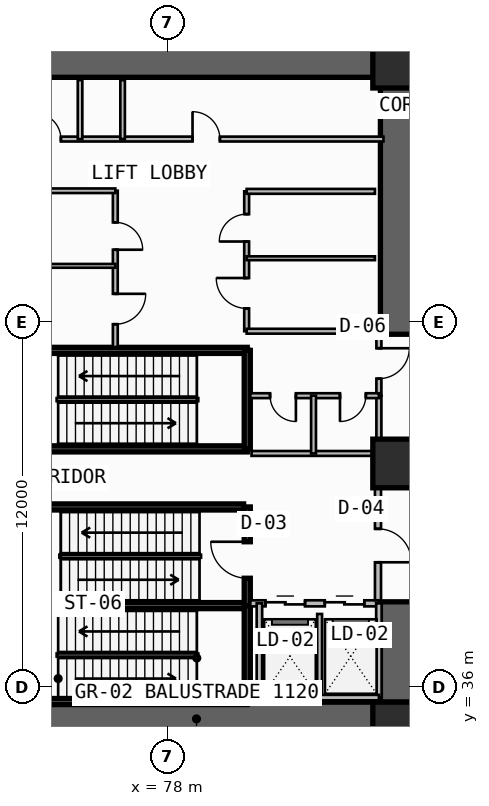
"""IFC4 building model, lengths in metres.
Left out: names, types, materials, properties, quantities, classifications, styles, units other than length and angle.
Written with IfcOpenShell. Run it as: python <this file> out.ifc"""

import sys

from ifc_helpers import new_model, si_unit, direction, frame, frame_2d, origin, origin_2d, place, context, subcontext, project, spatial, rectangle, extrude, element, fill, save


model = new_model("IFC4")
c1 = context("Model", 3, precision=1e-05, world=origin(), true_north=direction((0.0, 1.0)))
c2 = subcontext(c1, "Body", "Model", "MODEL_VIEW")
j1 = project(units=[si_unit("LENGTHUNIT", "METRE"), si_unit("PLANEANGLEUNIT", "RADIAN")], contexts=[c1])
p1 = place(None, origin())
s1 = spatial("IfcSite", under=j1, at=p1, CompositionType="ELEMENT")
p2 = place(p1, origin())
s2 = spatial("IfcBuilding", under=s1, at=p2, CompositionType="ELEMENT")
p3 = place(p2, frame((0.0, 0.0, -6.0)))
s3 = spatial("IfcBuildingStorey", under=s2, at=p3, CompositionType="ELEMENT", Elevation=-6.0)
p4 = place(p3, frame((71.8, 34.95, -0.6), z_axis=(0.0, 0.0, 1.0), x_axis=(1.0, 0.0, 0.0)))
e1 = element("IfcWall", 1, at=p4, inside=s3, PredefinedType="SHEAR", context=c2, shape_type="SweptSolid", body=[
    extrude(rectangle(XDim=14.3, YDim=1.1, at=frame_2d((7.15, 0.0))), origin(), (0.0, 0.0, 1.0), 6.2),
])
p5 = place(p3, frame((85.55, 35.5, -0.6), z_axis=(0.0, 0.0, 1.0), x_axis=(0.0, 1.0, 0.0)))
e2 = element("IfcWall", 2, at=p5, inside=s3, PredefinedType="SHEAR", context=c2, shape_type="SweptSolid", body=[
    extrude(rectangle(XDim=3.3, YDim=1.1, at=frame_2d((1.65, 0.0))), origin(), (0.0, 0.0, 1.0), 6.2),
])
p6 = place(p3, frame((71.8, 56.6, -0.6), z_axis=(0.0, 0.0, 1.0), x_axis=(1.0, 0.0, 0.0)))
e3 = element("IfcWall", 3, at=p6, inside=s3, PredefinedType="SHEAR", context=c2, shape_type="SweptSolid", body=[
    extrude(rectangle(XDim=14.3, YDim=1.1, at=frame_2d((7.15, 0.0))), origin(), (0.0, 0.0, 1.0), 6.2),
])
p7 = place(p3, frame((85.55, 47.6, -0.6), z_axis=(0.0, 0.0, 1.0), x_axis=(0.0, 1.0, 0.0)))
e4 = element("IfcWall", 4, at=p7, inside=s3, PredefinedType="SHEAR", context=c2, shape_type="SweptSolid", body=[
    extrude(rectangle(XDim=8.45, YDim=1.1, at=frame_2d((4.225, 0.0))), origin(), (0.0, 0.0, 1.0), 6.2),
])
for number, where, z_axis, x_axis in (
    (5, (85.55, 34.7, -0.6), (0.0, 0.0, 1.0), (1.0, 0.0, 0.0)),
    (6, (85.55, 43.35, -0.6), (0.0, 0.0, 1.0), (1.0, 0.0, 0.0)),
    (7, (85.55, 56.5, -0.6), (0.0, 0.0, 1.0), (1.0, 0.0, 0.0)),
):
    element("IfcColumn", number, at=place(p3, frame(where, z_axis=z_axis, x_axis=x_axis)), inside=s3, PredefinedType="COLUMN", context=c2, shape_type="SweptSolid", body=[
        extrude(rectangle(XDim=1.6, YDim=1.6, at=origin_2d()), origin(), (0.0, 0.0, 1.0), 6.6),
    ])
for number, where, z_axis, x_axis in (
    (8, (72.92, 35.52, -0.6), (0.0, 0.0, 1.0), (1.0, 0.0, 0.0)),
    (9, (72.92, 38.675, -0.6), (0.0, 0.0, 1.0), (1.0, 0.0, 0.0)),
):
    element("IfcWall", number, at=place(p3, frame(where, z_axis=z_axis, x_axis=x_axis)), inside=s3, PredefinedType="SOLIDWALL", context=c2, shape_type="SweptSolid", body=[
        extrude(rectangle(XDim=7.7, YDim=0.2, at=frame_2d((3.85, 0.0))), origin(), (0.0, 0.0, 1.0), 6.2),
    ])
p8 = place(p3, frame((80.62, 35.52, -0.6), z_axis=(0.0, 0.0, 1.0), x_axis=(0.0, 1.0, 0.0)))
e10 = element("IfcWall", 10, at=p8, inside=s3, PredefinedType="SOLIDWALL", context=c2, shape_type="SweptSolid", body=[
    extrude(rectangle(XDim=3.155, YDim=0.2, at=frame_2d((1.578, 0.0))), origin(), (0.0, 0.0, 1.0), 6.2),
])
p9 = place(p3, frame((80.62, 38.675, -0.6), z_axis=(0.0, 0.0, 1.0), x_axis=(0.0, 1.0, 0.0)))
e11 = element("IfcWall", 11, at=p9, inside=s3, PredefinedType="SOLIDWALL", context=c2, shape_type="SweptSolid", body=[
    extrude(rectangle(XDim=3.245, YDim=0.2, at=frame_2d((1.623, 0.0))), origin(), (0.0, 0.0, 1.0), 6.2),
])
p10 = place(p9, frame((0.9, 0.0, 0.6)))
e12 = element("IfcOpeningElement", 12, at=p10, cuts=e11, PredefinedType="OPENING", context=c2, shape_type="SweptSolid", body=[
    extrude(rectangle(XDim=1.2, YDim=2.2, at=frame_2d((0.6, 1.1))), frame((0.0, 0.11, 0.0), z_axis=(0.0, -1.0, 0.0), x_axis=(1.0, 0.0, 0.0)), (0.0, 0.0, 1.0), 0.22),
])
p11 = place(p3, frame((80.72, 38.75, 0.0), z_axis=(0.0, 0.0, 1.0), x_axis=(1.0, 0.0, 0.0)))
e13 = element("IfcWall", 13, at=p11, inside=s3, PredefinedType="SOLIDWALL", context=c2, shape_type="SweptSolid", body=[
    extrude(rectangle(XDim=4.26, YDim=0.2, at=frame_2d((2.13, 0.0))), origin(), (0.0, 0.0, 1.0), 5.6),
])
p12 = place(p11, frame((0.5, 0.0, 0.0)))
e14 = element("IfcOpeningElement", 14, at=p12, cuts=e13, PredefinedType="OPENING", context=c2, shape_type="SweptSolid", body=[
    extrude(rectangle(XDim=1.3, YDim=2.3, at=frame_2d((0.65, 1.15))), frame((0.0, 0.11, 0.0), z_axis=(0.0, -1.0, 0.0), x_axis=(1.0, 0.0, 0.0)), (0.0, 0.0, 1.0), 0.22),
])
p13 = place(p11, frame((2.45, 0.0, 0.0)))
e15 = element("IfcOpeningElement", 15, at=p13, cuts=e13, PredefinedType="OPENING", context=c2, shape_type="SweptSolid", body=[
    extrude(rectangle(XDim=1.3, YDim=2.3, at=frame_2d((0.65, 1.15))), frame((0.0, 0.11, 0.0), z_axis=(0.0, -1.0, 0.0), x_axis=(1.0, 0.0, 0.0)), (0.0, 0.0, 1.0), 0.22),
])
p14 = place(p3, frame((83.0, 35.65, 0.0), z_axis=(0.0, 0.0, 1.0), x_axis=(0.0, 1.0, 0.0)))
e16 = element("IfcWall", 16, at=p14, inside=s3, PredefinedType="PLUMBINGWALL", context=c2, shape_type="SweptSolid", body=[
    extrude(rectangle(XDim=2.75, YDim=0.16, at=frame_2d((1.375, 0.0))), origin(), (0.0, 0.0, 1.0), 5.6),
])
for number, where, z_axis, x_axis in (
    (17, (84.95, 35.65, 0.0), (0.0, 0.0, 1.0), (0.0, 1.0, 0.0)),
    (18, (81.02, 35.65, 0.0), (0.0, 0.0, 1.0), (0.0, 1.0, 0.0)),
):
    element("IfcWall", number, at=place(p3, frame(where, z_axis=z_axis, x_axis=x_axis)), inside=s3, PredefinedType="SOLIDWALL", context=c2, shape_type="SweptSolid", body=[
        extrude(rectangle(XDim=3.1, YDim=0.18, at=frame_2d((1.55, 0.0))), origin(), (0.0, 0.0, 1.0), 5.6),
    ])
p15 = place(p3, frame((81.02, 35.65, 0.0), z_axis=(0.0, 0.0, 1.0), x_axis=(1.0, 0.0, 0.0)))
e19 = element("IfcWall", 19, at=p15, inside=s3, PredefinedType="SOLIDWALL", context=c2, shape_type="SweptSolid", body=[
    extrude(rectangle(XDim=3.93, YDim=0.18, at=frame_2d((1.965, 0.0))), origin(), (0.0, 0.0, 1.0), 5.6),
])
p16 = place(p3, frame((84.92, 38.85, 0.0), z_axis=(0.0, 0.0, 1.0), x_axis=(0.0, 1.0, 0.0)))
e20 = element("IfcWall", 20, at=p16, inside=s3, PredefinedType="SOLIDWALL", context=c2, shape_type="SweptSolid", body=[
    extrude(rectangle(XDim=4.83, YDim=0.2, at=frame_2d((2.415, 0.0))), origin(), (0.0, 0.0, 1.0), 5.6),
])
p17 = place(p16, frame((1.25, 0.0, 0.0)))
e21 = element("IfcOpeningElement", 21, at=p17, cuts=e20, PredefinedType="OPENING", context=c2, shape_type="SweptSolid", body=[
    extrude(rectangle(XDim=1.1, YDim=2.2, at=frame_2d((0.55, 1.1))), frame((0.0, 0.11, 0.0), z_axis=(0.0, -1.0, 0.0), x_axis=(1.0, 0.0, 0.0)), (0.0, 0.0, 1.0), 0.22),
])
p18 = place(p3, frame((72.92, 41.92, -0.6), z_axis=(0.0, 0.0, 1.0), x_axis=(1.0, 0.0, 0.0)))
e22 = element("IfcWall", 22, at=p18, inside=s3, PredefinedType="SOLIDWALL", context=c2, shape_type="SweptSolid", body=[
    extrude(rectangle(XDim=7.58, YDim=0.2, at=frame_2d((3.79, 0.0))), origin(), (0.0, 0.0, 1.0), 6.2),
])
for number, where, z_axis, x_axis in (
    (23, (72.92, 43.83, -0.6), (0.0, 0.0, 1.0), (1.0, 0.0, 0.0)),
    (24, (72.92, 47.07, -0.6), (0.0, 0.0, 1.0), (1.0, 0.0, 0.0)),
):
    element("IfcWall", number, at=place(p3, frame(where, z_axis=z_axis, x_axis=x_axis)), inside=s3, PredefinedType="SOLIDWALL", context=c2, shape_type="SweptSolid", body=[
        extrude(rectangle(XDim=7.7, YDim=0.2, at=frame_2d((3.85, 0.0))), origin(), (0.0, 0.0, 1.0), 6.2),
    ])
p19 = place(p3, frame((80.62, 43.83, -0.6), z_axis=(0.0, 0.0, 1.0), x_axis=(0.0, 1.0, 0.0)))
e25 = element("IfcWall", 25, at=p19, inside=s3, PredefinedType="SOLIDWALL", context=c2, shape_type="SweptSolid", body=[
    extrude(rectangle(XDim=3.24, YDim=0.2, at=frame_2d((1.62, 0.0))), origin(), (0.0, 0.0, 1.0), 6.2),
])
p20 = place(p3, frame((84.95, 43.68, 0.0), z_axis=(0.0, 0.0, 1.0), x_axis=(0.0, 1.0, 0.0)))
e26 = element("IfcWall", 26, at=p20, inside=s3, PredefinedType="PLUMBINGWALL", context=c2, shape_type="SweptSolid", body=[
    extrude(rectangle(XDim=1.9, YDim=0.165, at=frame_2d((0.95, 0.0))), origin(), (0.0, 0.0, 1.0), 5.6),
])
p21 = place(p3, frame((84.95, 45.58, 0.0), z_axis=(0.0, 0.0, 1.0), x_axis=(0.0, 1.0, 0.0)))
e27 = element("IfcWall", 27, at=p21, inside=s3, PredefinedType="PARTITIONING", context=c2, shape_type="SweptSolid", body=[
    extrude(rectangle(XDim=2.12, YDim=0.165, at=frame_2d((1.06, 0.0))), origin(), (0.0, 0.0, 1.0), 5.6),
])
p22 = place(p21, frame((0.56, 0.0, 0.0)))
e28 = element("IfcOpeningElement", 28, at=p22, cuts=e27, PredefinedType="OPENING", context=c2, shape_type="SweptSolid", body=[
    extrude(rectangle(XDim=1.0, YDim=2.2, at=frame_2d((0.5, 1.1))), frame((0.0, 0.093, 0.0), z_axis=(0.0, -1.0, 0.0), x_axis=(1.0, 0.0, 0.0)), (0.0, 0.0, 1.0), 0.185),
])
p23 = place(p3, frame((80.72, 45.58, 0.0), z_axis=(0.0, 0.0, 1.0), x_axis=(1.0, 0.0, 0.0)))
e29 = element("IfcWall", 29, at=p23, inside=s3, PredefinedType="PLUMBINGWALL", context=c2, shape_type="SweptSolid", body=[
    extrude(rectangle(XDim=4.23, YDim=0.16, at=frame_2d((2.115, 0.0))), origin(), (0.0, 0.0, 1.0), 5.6),
])
p24 = place(p23, frame((0.65, 0.0, 0.0)))
e30 = element("IfcOpeningElement", 30, at=p24, cuts=e29, PredefinedType="OPENING", context=c2, shape_type="SweptSolid", body=[
    extrude(rectangle(XDim=0.85, YDim=2.05, at=frame_2d((0.425, 1.025))), frame((0.0, 0.09, 0.0), z_axis=(0.0, -1.0, 0.0), x_axis=(1.0, 0.0, 0.0)), (0.0, 0.0, 1.0), 0.18),
])
p25 = place(p23, frame((2.95, 0.0, 0.0)))
e31 = element("IfcOpeningElement", 31, at=p25, cuts=e29, PredefinedType="OPENING", context=c2, shape_type="SweptSolid", body=[
    extrude(rectangle(XDim=0.85, YDim=2.05, at=frame_2d((0.425, 1.025))), frame((0.0, 0.09, 0.0), z_axis=(0.0, -1.0, 0.0), x_axis=(1.0, 0.0, 0.0)), (0.0, 0.0, 1.0), 0.18),
])
p26 = place(p3, frame((80.76, 43.68, 0.0), z_axis=(0.0, 0.0, 1.0), x_axis=(1.0, 0.0, 0.0)))
e32 = element("IfcWall", 32, at=p26, inside=s3, PredefinedType="PLUMBINGWALL", context=c2, shape_type="SweptSolid", body=[
    extrude(rectangle(XDim=4.19, YDim=0.16, at=frame_2d((2.095, 0.0))), origin(), (0.0, 0.0, 1.0), 5.6),
])
p27 = place(p3, frame((82.8, 43.68, 0.0), z_axis=(0.0, 0.0, 1.0), x_axis=(0.0, 1.0, 0.0)))
e33 = element("IfcWall", 33, at=p27, inside=s3, PredefinedType="PLUMBINGWALL", context=c2, shape_type="SweptSolid", body=[
    extrude(rectangle(XDim=1.9, YDim=0.16, at=frame_2d((0.95, 0.0))), origin(), (0.0, 0.0, 1.0), 5.6),
])
p28 = place(p3, frame((76.28, 47.18, 0.0), z_axis=(0.0, 0.0, 1.0), x_axis=(0.0, 1.0, 0.0)))
e34 = element("IfcWall", 34, at=p28, inside=s3, PredefinedType="SOLIDWALL", context=c2, shape_type="SweptSolid", body=[
    extrude(rectangle(XDim=5.14, YDim=0.16, at=frame_2d((2.57, 0.0))), origin(), (0.0, 0.0, 1.0), 5.6),
])
p29 = place(p28, frame((0.75, 0.0, 0.0)))
e35 = element("IfcOpeningElement", 35, at=p29, cuts=e34, PredefinedType="OPENING", context=c2, shape_type="SweptSolid", body=[
    extrude(rectangle(XDim=1.0, YDim=2.2, at=frame_2d((0.5, 1.1))), frame((0.0, 0.09, 0.0), z_axis=(0.0, -1.0, 0.0), x_axis=(1.0, 0.0, 0.0)), (0.0, 0.0, 1.0), 0.18),
])
p30 = place(p28, frame((3.2, 0.0, 0.0)))
e36 = element("IfcOpeningElement", 36, at=p30, cuts=e34, PredefinedType="OPENING", context=c2, shape_type="SweptSolid", body=[
    extrude(rectangle(XDim=0.9, YDim=2.1, at=frame_2d((0.45, 1.05))), frame((0.0, 0.09, 0.0), z_axis=(0.0, -1.0, 0.0), x_axis=(1.0, 0.0, 0.0)), (0.0, 0.0, 1.0), 0.18),
])
p31 = place(p3, frame((72.95, 52.32, 0.0), z_axis=(0.0, 0.0, 1.0), x_axis=(1.0, 0.0, 0.0)))
e37 = element("IfcWall", 37, at=p31, inside=s3, PredefinedType="SOLIDWALL", context=c2, shape_type="SweptSolid", body=[
    extrude(rectangle(XDim=3.33, YDim=0.15, at=frame_2d((1.665, 0.0))), origin(), (0.0, 0.0, 1.0), 5.6),
])
p32 = place(p3, frame((73.0, 49.85, 0.0), z_axis=(0.0, 0.0, 1.0), x_axis=(1.0, 0.0, 0.0)))
e38 = element("IfcWall", 38, at=p32, inside=s3, PredefinedType="PARTITIONING", context=c2, shape_type="SweptSolid", body=[
    extrude(rectangle(XDim=3.28, YDim=0.125, at=frame_2d((1.64, 0.0))), origin(), (0.0, 0.0, 1.0), 5.6),
])
p33 = place(p3, frame((80.6, 47.7, 0.0), z_axis=(0.0, 0.0, 1.0), x_axis=(0.0, 1.0, 0.0)))
e39 = element("IfcWall", 39, at=p33, inside=s3, PredefinedType="SOLIDWALL", context=c2, shape_type="SweptSolid", body=[
    extrude(rectangle(XDim=4.6, YDim=0.16, at=frame_2d((2.3, 0.0))), origin(), (0.0, 0.0, 1.0), 5.6),
])
p34 = place(p33, frame((0.75, 0.0, 0.0)))
e40 = element("IfcOpeningElement", 40, at=p34, cuts=e39, PredefinedType="OPENING", context=c2, shape_type="SweptSolid", body=[
    extrude(rectangle(XDim=1.0, YDim=2.2, at=frame_2d((0.5, 1.1))), frame((0.0, 0.09, 0.0), z_axis=(0.0, -1.0, 0.0), x_axis=(1.0, 0.0, 0.0)), (0.0, 0.0, 1.0), 0.18),
])
p35 = place(p33, frame((2.95, 0.0, 0.0)))
e41 = element("IfcOpeningElement", 41, at=p35, cuts=e39, PredefinedType="OPENING", context=c2, shape_type="SweptSolid", body=[
    extrude(rectangle(XDim=0.9, YDim=2.1, at=frame_2d((0.45, 1.05))), frame((0.0, 0.09, 0.0), z_axis=(0.0, -1.0, 0.0), x_axis=(1.0, 0.0, 0.0)), (0.0, 0.0, 1.0), 0.18),
])
p36 = place(p3, frame((80.6, 47.7, 0.0), z_axis=(0.0, 0.0, 1.0), x_axis=(1.0, 0.0, 0.0)))
e42 = element("IfcWall", 42, at=p36, inside=s3, PredefinedType="SOLIDWALL", context=c2, shape_type="SweptSolid", body=[
    extrude(rectangle(XDim=4.4, YDim=0.16, at=frame_2d((2.2, 0.0))), origin(), (0.0, 0.0, 1.0), 5.6),
])
p37 = place(p3, frame((80.6, 52.3, 0.0), z_axis=(0.0, 0.0, 1.0), x_axis=(1.0, 0.0, 0.0)))
e43 = element("IfcWall", 43, at=p37, inside=s3, PredefinedType="SOLIDWALL", context=c2, shape_type="SweptSolid", body=[
    extrude(rectangle(XDim=4.22, YDim=0.16, at=frame_2d((2.11, 0.0))), origin(), (0.0, 0.0, 1.0), 5.6),
])
p38 = place(p3, frame((80.6, 50.1, 0.0), z_axis=(0.0, 0.0, 1.0), x_axis=(1.0, 0.0, 0.0)))
e44 = element("IfcWall", 44, at=p38, inside=s3, PredefinedType="PARTITIONING", context=c2, shape_type="SweptSolid", body=[
    extrude(rectangle(XDim=4.22, YDim=0.125, at=frame_2d((2.11, 0.0))), origin(), (0.0, 0.0, 1.0), 5.6),
])
p39 = place(p3, frame((73.02, 54.02, 0.0), z_axis=(0.0, 0.0, 1.0), x_axis=(1.0, 0.0, 0.0)))
e45 = element("IfcWall", 45, at=p39, inside=s3, PredefinedType="SOLIDWALL", context=c2, shape_type="SweptSolid", body=[
    extrude(rectangle(XDim=12.08, YDim=0.16, at=frame_2d((6.04, 0.0))), origin(), (0.0, 0.0, 1.0), 5.6),
])
p40 = place(p39, frame((0.62, 0.0, 0.0)))
e46 = element("IfcOpeningElement", 46, at=p40, cuts=e45, PredefinedType="OPENING", context=c2, shape_type="SweptSolid", body=[
    extrude(rectangle(XDim=0.85, YDim=2.05, at=frame_2d((0.425, 1.025))), frame((0.0, 0.09, 0.0), z_axis=(0.0, -1.0, 0.0), x_axis=(1.0, 0.0, 0.0)), (0.0, 0.0, 1.0), 0.18),
])
p41 = place(p39, frame((5.8, 0.0, 0.0)))
e47 = element("IfcOpeningElement", 47, at=p41, cuts=e45, PredefinedType="OPENING", context=c2, shape_type="SweptSolid", body=[
    extrude(rectangle(XDim=0.9, YDim=2.1, at=frame_2d((0.45, 1.05))), frame((0.0, 0.09, 0.0), z_axis=(0.0, -1.0, 0.0), x_axis=(1.0, 0.0, 0.0)), (0.0, 0.0, 1.0), 0.18),
])
for number, where, z_axis, x_axis in (
    (48, (75.12, 54.02, 0.0), (0.0, 0.0, 1.0), (0.0, 1.0, 0.0)),
    (49, (76.52, 54.02, 0.0), (0.0, 0.0, 1.0), (0.0, 1.0, 0.0)),
):
    element("IfcWall", number, at=place(p3, frame(where, z_axis=z_axis, x_axis=x_axis)), inside=s3, PredefinedType="PLUMBINGWALL", context=c2, shape_type="SweptSolid", body=[
        extrude(rectangle(XDim=1.94, YDim=0.15, at=frame_2d((0.97, 0.0))), origin(), (0.0, 0.0, 1.0), 5.6),
    ])
p42 = place(p10, origin())
e50 = element("IfcDoor", 50, at=p42, inside=s3, OperationType="SINGLE_SWING_RIGHT", PredefinedType="USERDEFINED", context=c2, shape_type="SweptSolid", body=[
    extrude(rectangle(XDim=1.2, YDim=2.2, at=frame_2d((0.6, 1.1))), frame((0.0, 0.025, 0.0), z_axis=(0.0, -1.0, 0.0), x_axis=(1.0, 0.0, 0.0)), (0.0, 0.0, 1.0), 0.05),
])
fill(e12, e50)
p43 = place(p12, origin())
e51 = element("IfcDoor", 51, at=p43, inside=s3, OperationType="DOUBLE_DOOR_SLIDING", PredefinedType="DOOR", context=c2, shape_type="SweptSolid", body=[
    extrude(rectangle(XDim=1.3, YDim=2.3, at=frame_2d((0.65, 1.15))), frame((0.0, 0.025, 0.0), z_axis=(0.0, -1.0, 0.0), x_axis=(1.0, 0.0, 0.0)), (0.0, 0.0, 1.0), 0.05),
])
fill(e14, e51)
p44 = place(p13, origin())
e52 = element("IfcDoor", 52, at=p44, inside=s3, OperationType="DOUBLE_DOOR_SLIDING", PredefinedType="DOOR", context=c2, shape_type="SweptSolid", body=[
    extrude(rectangle(XDim=1.3, YDim=2.3, at=frame_2d((0.65, 1.15))), frame((0.0, 0.025, 0.0), z_axis=(0.0, -1.0, 0.0), x_axis=(1.0, 0.0, 0.0)), (0.0, 0.0, 1.0), 0.05),
])
fill(e15, e52)
p45 = place(p17, frame((1.1, 0.0, 0.0), z_axis=(0.0, 0.0, 1.0), x_axis=(-1.0, 0.0, 0.0)))
e53 = element("IfcDoor", 53, at=p45, inside=s3, OperationType="SINGLE_SWING_RIGHT", PredefinedType="DOOR", context=c2, shape_type="SweptSolid", body=[
    extrude(rectangle(XDim=1.1, YDim=2.2, at=frame_2d((0.55, 1.1))), frame((0.0, 0.025, 0.0), z_axis=(0.0, -1.0, 0.0), x_axis=(1.0, 0.0, 0.0)), (0.0, 0.0, 1.0), 0.05),
])
fill(e21, e53)
p46 = place(p22, frame((1.0, 0.0, 0.0), z_axis=(0.0, 0.0, 1.0), x_axis=(-1.0, 0.0, 0.0)))
e54 = element("IfcDoor", 54, at=p46, inside=s3, OperationType="SINGLE_SWING_LEFT", PredefinedType="DOOR", context=c2, shape_type="SweptSolid", body=[
    extrude(rectangle(XDim=1.0, YDim=2.2, at=frame_2d((0.5, 1.1))), frame((0.0, 0.025, 0.0), z_axis=(0.0, -1.0, 0.0), x_axis=(1.0, 0.0, 0.0)), (0.0, 0.0, 1.0), 0.05),
])
fill(e28, e54)
p47 = place(p24, frame((0.85, 0.0, 0.0), z_axis=(0.0, 0.0, 1.0), x_axis=(-1.0, 0.0, 0.0)))
e55 = element("IfcDoor", 55, at=p47, inside=s3, OperationType="SINGLE_SWING_LEFT", PredefinedType="DOOR", context=c2, shape_type="SweptSolid", body=[
    extrude(rectangle(XDim=0.85, YDim=2.05, at=frame_2d((0.425, 1.025))), frame((0.0, 0.025, 0.0), z_axis=(0.0, -1.0, 0.0), x_axis=(1.0, 0.0, 0.0)), (0.0, 0.0, 1.0), 0.05),
])
fill(e30, e55)
p48 = place(p25, frame((0.85, 0.0, 0.0), z_axis=(0.0, 0.0, 1.0), x_axis=(-1.0, 0.0, 0.0)))
e56 = element("IfcDoor", 56, at=p48, inside=s3, OperationType="SINGLE_SWING_RIGHT", PredefinedType="DOOR", context=c2, shape_type="SweptSolid", body=[
    extrude(rectangle(XDim=0.85, YDim=2.05, at=frame_2d((0.425, 1.025))), frame((0.0, 0.025, 0.0), z_axis=(0.0, -1.0, 0.0), x_axis=(1.0, 0.0, 0.0)), (0.0, 0.0, 1.0), 0.05),
])
fill(e31, e56)
p49 = place(p29, frame((1.0, 0.0, 0.0), z_axis=(0.0, 0.0, 1.0), x_axis=(-1.0, 0.0, 0.0)))
e57 = element("IfcDoor", 57, at=p49, inside=s3, OperationType="SINGLE_SWING_LEFT", PredefinedType="DOOR", context=c2, shape_type="SweptSolid", body=[
    extrude(rectangle(XDim=1.0, YDim=2.2, at=frame_2d((0.5, 1.1))), frame((0.0, 0.025, 0.0), z_axis=(0.0, -1.0, 0.0), x_axis=(1.0, 0.0, 0.0)), (0.0, 0.0, 1.0), 0.05),
])
fill(e35, e57)
p50 = place(p30, frame((0.9, 0.0, 0.0), z_axis=(0.0, 0.0, 1.0), x_axis=(-1.0, 0.0, 0.0)))
e58 = element("IfcDoor", 58, at=p50, inside=s3, OperationType="SINGLE_SWING_RIGHT", PredefinedType="DOOR", context=c2, shape_type="SweptSolid", body=[
    extrude(rectangle(XDim=0.9, YDim=2.1, at=frame_2d((0.45, 1.05))), frame((0.0, 0.025, 0.0), z_axis=(0.0, -1.0, 0.0), x_axis=(1.0, 0.0, 0.0)), (0.0, 0.0, 1.0), 0.05),
])
fill(e36, e58)
p51 = place(p34, origin())
e59 = element("IfcDoor", 59, at=p51, inside=s3, OperationType="SINGLE_SWING_RIGHT", PredefinedType="DOOR", context=c2, shape_type="SweptSolid", body=[
    extrude(rectangle(XDim=1.0, YDim=2.2, at=frame_2d((0.5, 1.1))), frame((0.0, 0.025, 0.0), z_axis=(0.0, -1.0, 0.0), x_axis=(1.0, 0.0, 0.0)), (0.0, 0.0, 1.0), 0.05),
])
fill(e40, e59)
p52 = place(p35, origin())
e60 = element("IfcDoor", 60, at=p52, inside=s3, OperationType="SINGLE_SWING_LEFT", PredefinedType="DOOR", context=c2, shape_type="SweptSolid", body=[
    extrude(rectangle(XDim=0.9, YDim=2.1, at=frame_2d((0.45, 1.05))), frame((0.0, 0.025, 0.0), z_axis=(0.0, -1.0, 0.0), x_axis=(1.0, 0.0, 0.0)), (0.0, 0.0, 1.0), 0.05),
])
fill(e41, e60)
p53 = place(p40, origin())
e61 = element("IfcDoor", 61, at=p53, inside=s3, OperationType="SINGLE_SWING_LEFT", PredefinedType="DOOR", context=c2, shape_type="SweptSolid", body=[
    extrude(rectangle(XDim=0.85, YDim=2.05, at=frame_2d((0.425, 1.025))), frame((0.0, 0.025, 0.0), z_axis=(0.0, -1.0, 0.0), x_axis=(1.0, 0.0, 0.0)), (0.0, 0.0, 1.0), 0.05),
])
fill(e46, e61)
p54 = place(p41, origin())
e62 = element("IfcDoor", 62, at=p54, inside=s3, OperationType="SINGLE_SWING_LEFT", PredefinedType="DOOR", context=c2, shape_type="SweptSolid", body=[
    extrude(rectangle(XDim=0.9, YDim=2.1, at=frame_2d((0.45, 1.05))), frame((0.0, 0.025, 0.0), z_axis=(0.0, -1.0, 0.0), x_axis=(1.0, 0.0, 0.0)), (0.0, 0.0, 1.0), 0.05),
])
fill(e47, e62)
save(model, sys.argv[1])
